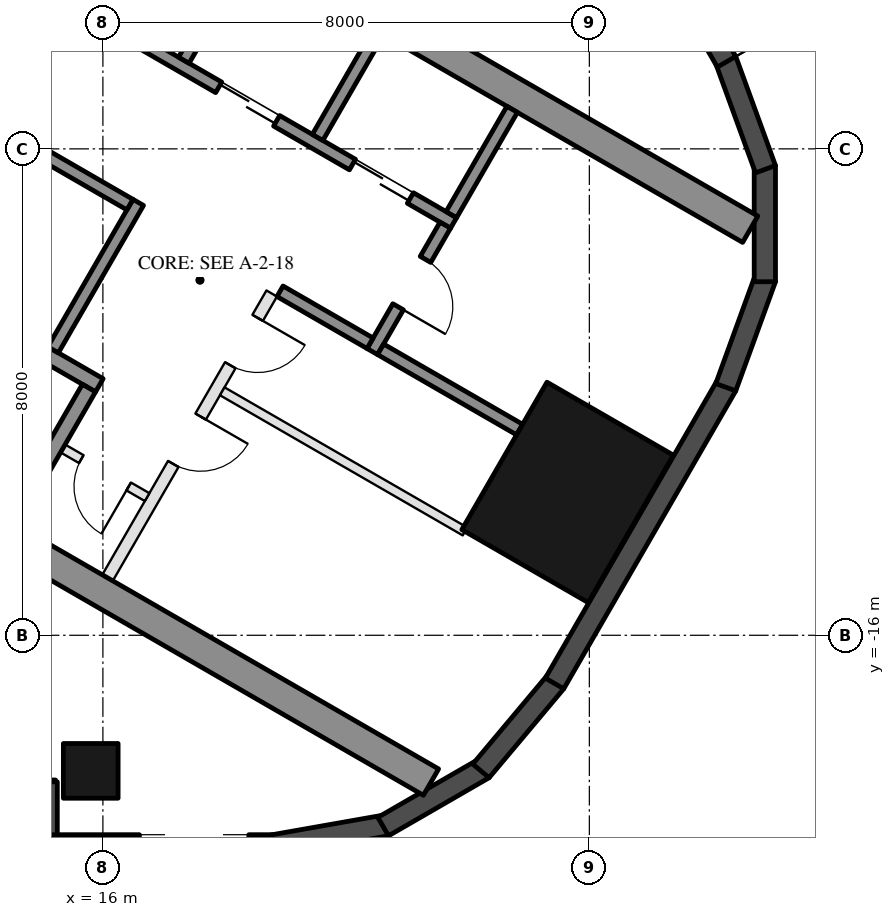
"""IFC4 building model, lengths in metres.
Left out: names, types, materials, properties, quantities, classifications, styles, units other than length and angle.
Written with IfcOpenShell. Run it as: python <this file> out.ifc"""

import sys

from ifc_helpers import new_model, si_unit, direction, frame, frame_2d, origin, origin_2d, place, context, subcontext, project, spatial, rectangle, hollow_rectangle, extrude, element, fill, save


model = new_model("IFC4")
c1 = context("Model", 3, precision=1e-05, world=origin(), true_north=direction((0.0, 1.0)))
c2 = subcontext(c1, "Body", "Model", "MODEL_VIEW")
j1 = project(units=[si_unit("LENGTHUNIT", "METRE"), si_unit("PLANEANGLEUNIT", "RADIAN")], contexts=[c1])
p1 = place(None, origin())
s1 = spatial("IfcSite", under=j1, at=p1, CompositionType="ELEMENT")
p2 = place(p1, origin())
s2 = spatial("IfcBuilding", under=s1, at=p2, CompositionType="ELEMENT")
p3 = place(p2, frame((0.0, 0.0, 87.2)))
s3 = spatial("IfcBuildingStorey", under=s2, at=p3, CompositionType="ELEMENT", Elevation=87.2)
p4 = place(p3, frame((15.8, -18.23, 0.0), z_axis=(0.0, 0.0, 1.0), x_axis=(-1.0, 0.0, 0.0)))
e1 = element("IfcColumn", 1, at=p4, inside=s3, PredefinedType="COLUMN", context=c2, shape_type="SweptSolid", body=[
    extrude(hollow_rectangle(XDim=0.9, YDim=0.9, WallThickness=0.04, at=origin_2d()), origin(), (0.0, 0.0, 1.0), 3.7),
])
p5 = place(p3, frame((23.643, -13.65, 0.0), z_axis=(0.0, 0.0, 1.0), x_axis=(0.5, 0.866025403784, 0.0)))
e2 = element("IfcColumn", 2, at=p5, inside=s3, PredefinedType="COLUMN", context=c2, shape_type="SweptSolid", body=[
    extrude(hollow_rectangle(XDim=2.8, YDim=2.4, WallThickness=0.07, at=origin_2d()), origin(), (0.0, 0.0, 1.0), 3.7),
])
p6 = place(p3, frame((8.48, -18.555, 0.0), z_axis=(0.0, 0.0, 1.0), x_axis=(1.0, 0.0, 0.0)))
e3 = element("IfcWall", 3, at=p6, inside=s3, PredefinedType="SOLIDWALL", context=c2, shape_type="SweptSolid", body=[
    extrude(rectangle(XDim=6.74, YDim=0.35, at=frame_2d((3.37, 0.0))), origin(), (0.0, 0.0, 1.0), 3.55),
])
p7 = place(p6, frame((0.32, 0.0, 0.0)))
e4 = element("IfcOpeningElement", 4, at=p7, cuts=e3, PredefinedType="OPENING", context=c2, shape_type="SweptSolid", body=[
    extrude(rectangle(XDim=2.4, YDim=2.4, at=frame_2d((1.2, 1.2))), frame((0.0, 0.185, 0.0), z_axis=(0.0, -1.0, 0.0), x_axis=(1.0, 0.0, 0.0)), (0.0, 0.0, 1.0), 0.37),
])
p8 = place(p6, frame((3.02, 0.0, 0.3)))
e5 = element("IfcOpeningElement", 5, at=p8, cuts=e3, PredefinedType="OPENING", context=c2, shape_type="SweptSolid", body=[
    extrude(rectangle(XDim=2.9, YDim=2.65, at=frame_2d((1.45, 1.325))), frame((0.0, 0.185, 0.0), z_axis=(0.0, -1.0, 0.0), x_axis=(1.0, 0.0, 0.0)), (0.0, 0.0, 1.0), 0.37),
])
p9 = place(p3, frame((15.075, -18.41, 0.0), z_axis=(0.0, 0.0, 1.0), x_axis=(0.0, -1.0, 0.0)))
e6 = element("IfcWall", 6, at=p9, inside=s3, PredefinedType="SOLIDWALL", context=c2, shape_type="SweptSolid", body=[
    extrude(rectangle(XDim=1.22, YDim=0.35, at=frame_2d((0.61, 0.0))), origin(), (0.0, 0.0, 1.0), 3.55),
])
p10 = place(p3, frame((14.9, -19.455, 0.0), z_axis=(0.0, 0.0, 1.0), x_axis=(1.0, 0.0, 0.0)))
e7 = element("IfcWall", 7, at=p10, inside=s3, PredefinedType="SOLIDWALL", context=c2, shape_type="SweptSolid", body=[
    extrude(rectangle(XDim=3.916, YDim=0.35, at=frame_2d((1.958, 0.0))), origin(), (0.0, 0.0, 1.0), 3.55),
])
p11 = place(p10, frame((1.7, 0.0, 0.3)))
e8 = element("IfcOpeningElement", 8, at=p11, cuts=e7, PredefinedType="OPENING", context=c2, shape_type="SweptSolid", body=[
    extrude(rectangle(XDim=1.8, YDim=2.65, at=frame_2d((0.9, 1.325))), frame((0.0, 0.185, 0.0), z_axis=(0.0, -1.0, 0.0), x_axis=(1.0, 0.0, 0.0)), (0.0, 0.0, 1.0), 0.37),
])
p12 = place(p3, frame((18.785, -19.458, 0.0), z_axis=(0.0, 0.0, 1.0), x_axis=(0.984798995425, 0.173697837091, 0.0)))
e9 = element("IfcWall", 9, at=p12, inside=s3, PredefinedType="SOLIDWALL", context=c2, shape_type="SweptSolid", body=[
    extrude(rectangle(XDim=1.91, YDim=0.35, at=frame_2d((0.955, 0.0))), origin(), (0.0, 0.0, 1.0), 3.55),
])
for number, where, z_axis, x_axis in (
    (10, (20.61, -19.147, 0.0), (0.0, 0.0, 1.0), (0.866, 0.5, 0.0)),
    (11, (22.217, -18.231, 0.0), (0.0, 0.0, 1.0), (0.643, 0.766, 0.0)),
):
    element("IfcWall", number, at=place(p3, frame(where, z_axis=z_axis, x_axis=x_axis)), inside=s3, PredefinedType="SOLIDWALL", context=c2, shape_type="SweptSolid", body=[
        extrude(rectangle(XDim=1.91, YDim=0.35, at=frame_2d((0.955, 0.0))), origin(), (0.0, 0.0, 1.0), 3.55),
    ])
p13 = place(p3, frame((23.427, -16.792, 0.0), z_axis=(0.0, 0.0, 1.0), x_axis=(0.500018773155, 0.866014564827, 0.0)))
e12 = element("IfcWall", 12, at=p13, inside=s3, PredefinedType="SOLIDWALL", context=c2, shape_type="SweptSolid", body=[
    extrude(rectangle(XDim=5.658, YDim=0.35, at=frame_2d((2.829, 0.0))), origin(), (0.0, 0.0, 1.0), 3.55),
])
for number, where, z_axis, x_axis in (
    (13, (26.244, -11.92, 0.0), (0.0, 0.0, 1.0), (0.342, 0.94, 0.0)),
    (14, (26.886, -10.185, 0.0), (0.0, 0.0, 1.0), (0.0, 1.0, 0.0)),
    (15, (26.897, -8.335, 0.0), (0.0, 0.0, 1.0), (-0.342, 0.94, 0.0)),
):
    element("IfcWall", number, at=place(p3, frame(where, z_axis=z_axis, x_axis=x_axis)), inside=s3, PredefinedType="SOLIDWALL", context=c2, shape_type="SweptSolid", body=[
        extrude(rectangle(XDim=1.91, YDim=0.35, at=frame_2d((0.955, 0.0))), origin(), (0.0, 0.0, 1.0), 3.55),
    ])
p14 = place(p3, frame((26.257, -6.567, 0.0), z_axis=(0.0, 0.0, 1.0), x_axis=(-0.500023526245, 0.866011820475, 0.0)))
e16 = element("IfcWall", 16, at=p14, inside=s3, PredefinedType="SOLIDWALL", context=c2, shape_type="SweptSolid", body=[
    extrude(rectangle(XDim=11.816, YDim=0.35, at=frame_2d((5.908, 0.0))), origin(), (0.0, 0.0, 1.0), 3.55),
])
p15 = place(p14, frame((0.38, 0.0, 0.3)))
e17 = element("IfcOpeningElement", 17, at=p15, cuts=e16, PredefinedType="OPENING", context=c2, shape_type="SweptSolid", body=[
    extrude(rectangle(XDim=1.8, YDim=2.65, at=frame_2d((0.9, 1.325))), frame((0.0, 0.185, 0.0), z_axis=(0.0, -1.0, 0.0), x_axis=(1.0, 0.0, 0.0)), (0.0, 0.0, 1.0), 0.37),
])
p16 = place(p14, frame((7.716, 0.0, 0.0)))
e18 = element("IfcOpeningElement", 18, at=p16, cuts=e16, PredefinedType="OPENING", context=c2, shape_type="SweptSolid", body=[
    extrude(rectangle(XDim=2.4, YDim=2.4, at=frame_2d((1.2, 1.2))), frame((0.0, 0.185, 0.0), z_axis=(0.0, -1.0, 0.0), x_axis=(1.0, 0.0, 0.0)), (0.0, 0.0, 1.0), 0.37),
])
p17 = place(p14, frame((3.816, 0.0, 0.3)))
e19 = element("IfcOpeningElement", 19, at=p17, cuts=e16, PredefinedType="OPENING", context=c2, shape_type="SweptSolid", body=[
    extrude(rectangle(XDim=1.6, YDim=2.65, at=frame_2d((0.8, 1.325))), frame((0.0, 0.185, 0.0), z_axis=(0.0, -1.0, 0.0), x_axis=(1.0, 0.0, 0.0)), (0.0, 0.0, 1.0), 0.37),
])
p18 = place(p14, frame((5.716, 0.0, 0.3)))
e20 = element("IfcOpeningElement", 20, at=p18, cuts=e16, PredefinedType="OPENING", context=c2, shape_type="SweptSolid", body=[
    extrude(rectangle(XDim=1.6, YDim=2.65, at=frame_2d((0.8, 1.325))), frame((0.0, 0.185, 0.0), z_axis=(0.0, -1.0, 0.0), x_axis=(1.0, 0.0, 0.0)), (0.0, 0.0, 1.0), 0.37),
])
for number, where, z_axis, x_axis in (
    (21, (8.547, -10.997, 0.0), (0.0, 0.0, 1.0), (0.866, -0.5, 0.0)),
    (22, (13.797, -1.903, 0.0), (0.0, 0.0, 1.0), (0.866, -0.5, 0.0)),
):
    element("IfcWall", number, at=place(p3, frame(where, z_axis=z_axis, x_axis=x_axis)), inside=s3, PredefinedType="SHEAR", context=c2, shape_type="SweptSolid", body=[
        extrude(rectangle(XDim=14.837, YDim=0.5, at=frame_2d((7.418, 0.0))), origin(), (0.0, 0.0, 1.0), 3.5),
    ])
p19 = place(p3, frame((10.356, -8.664, 0.0), z_axis=(0.0, 0.0, 1.0), x_axis=(0.866028629588, -0.499994412703, 0.0)))
e23 = element("IfcWall", 23, at=p19, inside=s3, PredefinedType="SHEAR", context=c2, shape_type="SweptSolid", body=[
    extrude(rectangle(XDim=6.45, YDim=0.25, at=frame_2d((3.225, 0.0))), origin(), (0.0, 0.0, 1.0), 3.5),
])
p20 = place(p19, frame((0.3, 0.0, 0.0)))
e24 = element("IfcOpeningElement", 24, at=p20, cuts=e23, PredefinedType="OPENING", context=c2, shape_type="SweptSolid", body=[
    extrude(rectangle(XDim=1.0, YDim=2.1, at=frame_2d((0.5, 1.05))), frame((0.0, 0.135, 0.0), z_axis=(0.0, -1.0, 0.0), x_axis=(1.0, 0.0, 0.0)), (0.0, 0.0, 1.0), 0.27),
])
p21 = place(p3, frame((14.496, -14.143, 0.0), z_axis=(0.0, 0.0, 1.0), x_axis=(0.500062241894, 0.865989465428, 0.0)))
e25 = element("IfcWall", 25, at=p21, inside=s3, PredefinedType="SHEAR", context=c2, shape_type="SweptSolid", body=[
    extrude(rectangle(XDim=2.55, YDim=0.25, at=frame_2d((1.275, 0.0))), origin(), (0.0, 0.0, 1.0), 3.5),
])
p22 = place(p3, frame((15.181, -11.305, 0.0), z_axis=(0.0, 0.0, 1.0), x_axis=(0.49994636267, 0.866056369097, 0.0)))
e26 = element("IfcWall", 26, at=p22, inside=s3, PredefinedType="SHEAR", context=c2, shape_type="SweptSolid", body=[
    extrude(rectangle(XDim=2.8, YDim=0.2, at=frame_2d((1.4, 0.0))), origin(), (0.0, 0.0, 1.0), 3.5),
])
p23 = place(p3, frame((14.02, -7.517, 0.0), z_axis=(0.0, 0.0, 1.0), x_axis=(0.866034573852, -0.49998411664, 0.0)))
e27 = element("IfcWall", 27, at=p23, inside=s3, PredefinedType="SHEAR", context=c2, shape_type="SweptSolid", body=[
    extrude(rectangle(XDim=2.8, YDim=0.2, at=frame_2d((1.4, 0.0))), origin(), (0.0, 0.0, 1.0), 3.5),
])
p24 = place(p3, frame((12.968, -4.138, 0.0), z_axis=(0.0, 0.0, 1.0), x_axis=(0.866028328073, -0.49999493495, 0.0)))
e28 = element("IfcWall", 28, at=p24, inside=s3, PredefinedType="SHEAR", context=c2, shape_type="SweptSolid", body=[
    extrude(rectangle(XDim=10.16, YDim=0.2, at=frame_2d((5.08, 0.0))), origin(), (0.0, 0.0, 1.0), 3.5),
])
p25 = place(p24, frame((0.62, 0.0, 0.0)))
e29 = element("IfcOpeningElement", 29, at=p25, cuts=e28, PredefinedType="OPENING", context=c2, shape_type="SweptSolid", body=[
    extrude(rectangle(XDim=1.1, YDim=2.1, at=frame_2d((0.55, 1.05))), frame((0.0, 0.11, 0.0), z_axis=(0.0, -1.0, 0.0), x_axis=(1.0, 0.0, 0.0)), (0.0, 0.0, 1.0), 0.22),
])
p26 = place(p24, frame((3.16, 0.0, 0.0)))
e30 = element("IfcOpeningElement", 30, at=p26, cuts=e28, PredefinedType="OPENING", context=c2, shape_type="SweptSolid", body=[
    extrude(rectangle(XDim=1.1, YDim=2.1, at=frame_2d((0.55, 1.05))), frame((0.0, 0.11, 0.0), z_axis=(0.0, -1.0, 0.0), x_axis=(1.0, 0.0, 0.0)), (0.0, 0.0, 1.0), 0.22),
])
p27 = place(p24, frame((5.7, 0.0, 0.0)))
e31 = element("IfcOpeningElement", 31, at=p27, cuts=e28, PredefinedType="OPENING", context=c2, shape_type="SweptSolid", body=[
    extrude(rectangle(XDim=1.1, YDim=2.1, at=frame_2d((0.55, 1.05))), frame((0.0, 0.11, 0.0), z_axis=(0.0, -1.0, 0.0), x_axis=(1.0, 0.0, 0.0)), (0.0, 0.0, 1.0), 0.22),
])
p28 = place(p24, frame((8.24, 0.0, 0.0)))
e32 = element("IfcOpeningElement", 32, at=p28, cuts=e28, PredefinedType="OPENING", context=c2, shape_type="SweptSolid", body=[
    extrude(rectangle(XDim=1.1, YDim=2.1, at=frame_2d((0.55, 1.05))), frame((0.0, 0.11, 0.0), z_axis=(0.0, -1.0, 0.0), x_axis=(1.0, 0.0, 0.0)), (0.0, 0.0, 1.0), 0.22),
])
p29 = place(p3, frame((20.43, -11.333, 0.0), z_axis=(0.0, 0.0, 1.0), x_axis=(0.500001309137, 0.866024647952, 0.0)))
e33 = element("IfcWall", 33, at=p29, inside=s3, PredefinedType="SHEAR", context=c2, shape_type="SweptSolid", body=[
    extrude(rectangle(XDim=2.4, YDim=0.2, at=frame_2d((1.2, 0.0))), origin(), (0.0, 0.0, 1.0), 3.5),
])
p30 = place(p29, frame((0.85, 0.0, 0.0)))
e34 = element("IfcOpeningElement", 34, at=p30, cuts=e33, PredefinedType="OPENING", context=c2, shape_type="SweptSolid", body=[
    extrude(rectangle(XDim=0.9, YDim=2.1, at=frame_2d((0.45, 1.05))), frame((0.0, 0.11, 0.0), z_axis=(0.0, -1.0, 0.0), x_axis=(1.0, 0.0, 0.0)), (0.0, 0.0, 1.0), 0.22),
])
p31 = place(p3, frame((18.913, -10.342, 0.0), z_axis=(0.0, 0.0, 1.0), x_axis=(0.866038183914, -0.499977863513, 0.0)))
e35 = element("IfcWall", 35, at=p31, inside=s3, PredefinedType="SHEAR", context=c2, shape_type="SweptSolid", body=[
    extrude(rectangle(XDim=1.71, YDim=0.2, at=frame_2d((0.855, 0.0))), origin(), (0.0, 0.0, 1.0), 3.5),
])
for number, where, z_axis, x_axis in (
    (36, (17.331, -6.542, 0.0), (0.0, 0.0, 1.0), (0.5, 0.866, 0.0)),
    (37, (19.531, -7.812, 0.0), (0.0, 0.0, 1.0), (0.5, 0.866, 0.0)),
    (38, (21.73, -9.082, 0.0), (0.0, 0.0, 1.0), (0.5, 0.866, 0.0)),
):
    element("IfcWall", number, at=place(p3, frame(where, z_axis=z_axis, x_axis=x_axis)), inside=s3, PredefinedType="SHEAR", context=c2, shape_type="SweptSolid", body=[
        extrude(rectangle(XDim=2.0, YDim=0.2, at=frame_2d((1.0, 0.0))), origin(), (0.0, 0.0, 1.0), 3.5),
    ])
p32 = place(p3, frame((20.567, -11.297, 0.0), z_axis=(0.0, 0.0, 1.0), x_axis=(0.866060851709, -0.499938597367, 0.0)))
e39 = element("IfcWall", 39, at=p32, inside=s3, PredefinedType="SHEAR", context=c2, shape_type="SweptSolid", body=[
    extrude(rectangle(XDim=2.64, YDim=0.2, at=frame_2d((1.32, 0.0))), origin(), (0.0, 0.0, 1.0), 3.5),
])
p33 = place(p3, frame((16.076, -15.055, 0.0), z_axis=(0.0, 0.0, 1.0), x_axis=(0.499995103361, 0.866028230842, 0.0)))
e40 = element("IfcWall", 40, at=p33, inside=s3, PredefinedType="PARTITIONING", context=c2, shape_type="SweptSolid", body=[
    extrude(rectangle(XDim=5.4, YDim=0.2, at=frame_2d((2.7, 0.0))), origin(), (0.0, 0.0, 1.0), 3.5),
])
p34 = place(p33, frame((2.163, 0.0, 0.0)))
e41 = element("IfcOpeningElement", 41, at=p34, cuts=e40, PredefinedType="OPENING", context=c2, shape_type="SweptSolid", body=[
    extrude(rectangle(XDim=0.9, YDim=2.1, at=frame_2d((0.45, 1.05))), frame((0.0, 0.11, 0.0), z_axis=(0.0, -1.0, 0.0), x_axis=(1.0, 0.0, 0.0)), (0.0, 0.0, 1.0), 0.22),
])
p35 = place(p33, frame((4.038, 0.0, 0.0)))
e42 = element("IfcOpeningElement", 42, at=p35, cuts=e40, PredefinedType="OPENING", context=c2, shape_type="SweptSolid", body=[
    extrude(rectangle(XDim=0.9, YDim=2.1, at=frame_2d((0.45, 1.05))), frame((0.0, 0.11, 0.0), z_axis=(0.0, -1.0, 0.0), x_axis=(1.0, 0.0, 0.0)), (0.0, 0.0, 1.0), 0.22),
])
p36 = place(p3, frame((15.342, -12.928, 0.0), z_axis=(0.0, 0.0, 1.0), x_axis=(0.865989903783, -0.500061482766, 0.0)))
e43 = element("IfcWall", 43, at=p36, inside=s3, PredefinedType="PARTITIONING", context=c2, shape_type="SweptSolid", body=[
    extrude(rectangle(XDim=1.6, YDim=0.15, at=frame_2d((0.8, 0.0))), origin(), (0.0, 0.0, 1.0), 3.5),
])
p37 = place(p36, frame((0.35, 0.0, 0.0)))
e44 = element("IfcOpeningElement", 44, at=p37, cuts=e43, PredefinedType="OPENING", context=c2, shape_type="SweptSolid", body=[
    extrude(rectangle(XDim=0.9, YDim=2.1, at=frame_2d((0.45, 1.05))), frame((0.0, 0.085, 0.0), z_axis=(0.0, -1.0, 0.0), x_axis=(1.0, 0.0, 0.0)), (0.0, 0.0, 1.0), 0.17),
])
p38 = place(p3, frame((17.963, -11.987, 0.0), z_axis=(0.0, 0.0, 1.0), x_axis=(0.865998608524, -0.500046407882, 0.0)))
e45 = element("IfcWall", 45, at=p38, inside=s3, PredefinedType="PARTITIONING", context=c2, shape_type="SweptSolid", body=[
    extrude(rectangle(XDim=4.61, YDim=0.15, at=frame_2d((2.305, 0.0))), origin(), (0.0, 0.0, 1.0), 3.5),
])
p39 = place(p37, frame((0.9, 0.0, 0.0), z_axis=(0.0, 0.0, 1.0), x_axis=(-1.0, 0.0, 0.0)))
e46 = element("IfcDoor", 46, at=p39, inside=s3, OperationType="SINGLE_SWING_LEFT", PredefinedType="DOOR", context=c2, shape_type="SweptSolid", body=[
    extrude(rectangle(XDim=0.9, YDim=2.1, at=frame_2d((0.45, 1.05))), frame((0.0, 0.025, 0.0), z_axis=(0.0, -1.0, 0.0), x_axis=(1.0, 0.0, 0.0)), (0.0, 0.0, 1.0), 0.05),
])
fill(e44, e46)
p40 = place(p27, origin())
e47 = element("IfcDoor", 47, at=p40, inside=s3, OperationType="DOUBLE_DOOR_SLIDING", PredefinedType="DOOR", context=c2, shape_type="SweptSolid", body=[
    extrude(rectangle(XDim=1.1, YDim=2.1, at=frame_2d((0.55, 1.05))), frame((0.0, 0.025, 0.0), z_axis=(0.0, -1.0, 0.0), x_axis=(1.0, 0.0, 0.0)), (0.0, 0.0, 1.0), 0.05),
])
fill(e31, e47)
p41 = place(p28, origin())
e48 = element("IfcDoor", 48, at=p41, inside=s3, OperationType="DOUBLE_DOOR_SLIDING", PredefinedType="DOOR", context=c2, shape_type="SweptSolid", body=[
    extrude(rectangle(XDim=1.1, YDim=2.1, at=frame_2d((0.55, 1.05))), frame((0.0, 0.025, 0.0), z_axis=(0.0, -1.0, 0.0), x_axis=(1.0, 0.0, 0.0)), (0.0, 0.0, 1.0), 0.05),
])
fill(e32, e48)
p42 = place(p30, frame((0.9, 0.0, 0.0), z_axis=(0.0, 0.0, 1.0), x_axis=(-1.0, 0.0, 0.0)))
e49 = element("IfcDoor", 49, at=p42, inside=s3, OperationType="SINGLE_SWING_RIGHT", PredefinedType="DOOR", context=c2, shape_type="SweptSolid", body=[
    extrude(rectangle(XDim=0.9, YDim=2.1, at=frame_2d((0.45, 1.05))), frame((0.0, 0.025, 0.0), z_axis=(0.0, -1.0, 0.0), x_axis=(1.0, 0.0, 0.0)), (0.0, 0.0, 1.0), 0.05),
])
fill(e34, e49)
p43 = place(p34, frame((0.9, 0.0, 0.0), z_axis=(0.0, 0.0, 1.0), x_axis=(-1.0, 0.0, 0.0)))
e50 = element("IfcDoor", 50, at=p43, inside=s3, OperationType="SINGLE_SWING_LEFT", PredefinedType="DOOR", context=c2, shape_type="SweptSolid", body=[
    extrude(rectangle(XDim=0.9, YDim=2.1, at=frame_2d((0.45, 1.05))), frame((0.0, 0.025, 0.0), z_axis=(0.0, -1.0, 0.0), x_axis=(1.0, 0.0, 0.0)), (0.0, 0.0, 1.0), 0.05),
])
fill(e41, e50)
p44 = place(p35, frame((0.9, 0.0, 0.0), z_axis=(0.0, 0.0, 1.0), x_axis=(-1.0, 0.0, 0.0)))
e51 = element("IfcDoor", 51, at=p44, inside=s3, OperationType="SINGLE_SWING_LEFT", PredefinedType="DOOR", context=c2, shape_type="SweptSolid", body=[
    extrude(rectangle(XDim=0.9, YDim=2.1, at=frame_2d((0.45, 1.05))), frame((0.0, 0.025, 0.0), z_axis=(0.0, -1.0, 0.0), x_axis=(1.0, 0.0, 0.0)), (0.0, 0.0, 1.0), 0.05),
])
fill(e42, e51)
save(model, sys.argv[1])
